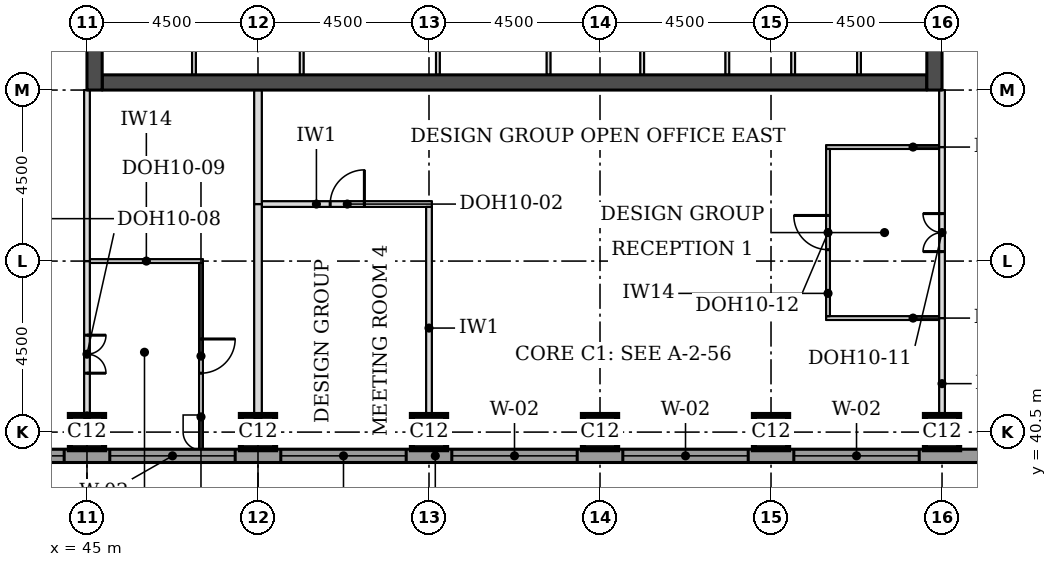
"""IFC4 building model, lengths in metres.
Left out: names, types, materials, properties, quantities, classifications, styles, units other than length and angle.
Written with IfcOpenShell. Run it as: python <this file> out.ifc"""

import sys

from ifc_helpers import new_model, si_unit, direction, frame, frame_2d, origin, origin_2d, place, context, subcontext, project, spatial, rectangle, extrude, element, fill, save


model = new_model("IFC4")
c1 = context("Model", 3, precision=1e-05, world=origin(), true_north=direction((0.0, 1.0)))
c2 = subcontext(c1, "Body", "Model", "MODEL_VIEW")
j1 = project(units=[si_unit("LENGTHUNIT", "METRE"), si_unit("PLANEANGLEUNIT", "RADIAN")], contexts=[c1])
p1 = place(None, origin())
s1 = spatial("IfcSite", under=j1, at=p1, CompositionType="ELEMENT")
p2 = place(p1, origin())
s2 = spatial("IfcBuilding", under=s1, at=p2, CompositionType="ELEMENT")
p3 = place(p2, frame((0.0, 0.0, 226.7)))
s3 = spatial("IfcBuildingStorey", under=s2, at=p3, CompositionType="ELEMENT", Elevation=226.7)
for number, where, z_axis, x_axis in (
    (1, (45.0, 40.5, 0.0), (0.0, 0.0, 1.0), (1.0, 0.0, 0.0)),
    (2, (49.5, 40.5, 0.0), (0.0, 0.0, 1.0), (1.0, 0.0, 0.0)),
    (3, (54.0, 40.5, 0.0), (0.0, 0.0, 1.0), (1.0, 0.0, 0.0)),
    (4, (58.5, 40.5, 0.0), (0.0, 0.0, 1.0), (1.0, 0.0, 0.0)),
    (5, (63.0, 40.5, 0.0), (0.0, 0.0, 1.0), (1.0, 0.0, 0.0)),
    (6, (67.5, 40.5, 0.0), (0.0, 0.0, 1.0), (1.0, 0.0, 0.0)),
):
    element("IfcColumn", number, at=place(p3, frame(where, z_axis=z_axis, x_axis=x_axis)), inside=s3, PredefinedType="COLUMN", context=c2, shape_type="SweptSolid", body=[
        extrude(rectangle(XDim=0.9, YDim=0.9, at=origin_2d()), origin(), (0.0, 0.0, 1.0), 3.7),
    ])
p4 = place(p3, frame((45.4, 49.7, 0.0), z_axis=(0.0, 0.0, 1.0), x_axis=(1.0, 0.0, 0.0)))
e7 = element("IfcWall", 7, at=p4, inside=s3, PredefinedType="SHEAR", context=c2, shape_type="SweptSolid", body=[
    extrude(rectangle(XDim=21.7, YDim=0.4, at=frame_2d((10.85, 0.0))), origin(), (0.0, 0.0, 1.0), 3.7),
])
p5 = place(p3, frame((45.2, 49.5, 0.0), z_axis=(0.0, 0.0, 1.0), x_axis=(0.0, 1.0, 0.0)))
e8 = element("IfcWall", 8, at=p5, inside=s3, PredefinedType="SHEAR", context=c2, shape_type="SweptSolid", body=[
    extrude(rectangle(XDim=22.5, YDim=0.4, at=frame_2d((11.25, 0.0))), origin(), (0.0, 0.0, 1.0), 3.7),
])
p6 = place(p5, frame((4.2, 0.0, 0.0)))
e9 = element("IfcOpeningElement", 9, at=p6, cuts=e8, PredefinedType="OPENING", context=c2, shape_type="SweptSolid", body=[
    extrude(rectangle(XDim=1.8, YDim=2.1, at=frame_2d((0.9, 1.05))), frame((0.0, 0.21, 0.0), z_axis=(0.0, -1.0, 0.0), x_axis=(1.0, 0.0, 0.0)), (0.0, 0.0, 1.0), 0.42),
])
p7 = place(p5, frame((6.9, 0.0, 0.0)))
e10 = element("IfcOpeningElement", 10, at=p7, cuts=e8, PredefinedType="OPENING", context=c2, shape_type="SweptSolid", body=[
    extrude(rectangle(XDim=1.1, YDim=2.1, at=frame_2d((0.55, 1.05))), frame((0.0, 0.21, 0.0), z_axis=(0.0, -1.0, 0.0), x_axis=(1.0, 0.0, 0.0)), (0.0, 0.0, 1.0), 0.42),
])
p8 = place(p5, frame((13.6, 0.0, 0.0)))
e11 = element("IfcOpeningElement", 11, at=p8, cuts=e8, PredefinedType="OPENING", context=c2, shape_type="SweptSolid", body=[
    extrude(rectangle(XDim=1.1, YDim=2.1, at=frame_2d((0.55, 1.05))), frame((0.0, 0.21, 0.0), z_axis=(0.0, -1.0, 0.0), x_axis=(1.0, 0.0, 0.0)), (0.0, 0.0, 1.0), 0.42),
])
p9 = place(p5, frame((16.5, 0.0, 0.0)))
e12 = element("IfcOpeningElement", 12, at=p9, cuts=e8, PredefinedType="OPENING", context=c2, shape_type="SweptSolid", body=[
    extrude(rectangle(XDim=1.8, YDim=2.1, at=frame_2d((0.9, 1.05))), frame((0.0, 0.21, 0.0), z_axis=(0.0, -1.0, 0.0), x_axis=(1.0, 0.0, 0.0)), (0.0, 0.0, 1.0), 0.42),
])
p10 = place(p3, frame((67.3, 49.5, 0.0), z_axis=(0.0, 0.0, 1.0), x_axis=(0.0, 1.0, 0.0)))
e13 = element("IfcWall", 13, at=p10, inside=s3, PredefinedType="SHEAR", context=c2, shape_type="SweptSolid", body=[
    extrude(rectangle(XDim=22.5, YDim=0.4, at=frame_2d((11.25, 0.0))), origin(), (0.0, 0.0, 1.0), 3.7),
])
p11 = place(p10, frame((4.2, 0.0, 0.0)))
e14 = element("IfcOpeningElement", 14, at=p11, cuts=e13, PredefinedType="OPENING", context=c2, shape_type="SweptSolid", body=[
    extrude(rectangle(XDim=1.8, YDim=2.1, at=frame_2d((0.9, 1.05))), frame((0.0, 0.21, 0.0), z_axis=(0.0, -1.0, 0.0), x_axis=(1.0, 0.0, 0.0)), (0.0, 0.0, 1.0), 0.42),
])
p12 = place(p10, frame((6.9, 0.0, 0.0)))
e15 = element("IfcOpeningElement", 15, at=p12, cuts=e13, PredefinedType="OPENING", context=c2, shape_type="SweptSolid", body=[
    extrude(rectangle(XDim=1.1, YDim=2.1, at=frame_2d((0.55, 1.05))), frame((0.0, 0.21, 0.0), z_axis=(0.0, -1.0, 0.0), x_axis=(1.0, 0.0, 0.0)), (0.0, 0.0, 1.0), 0.42),
])
p13 = place(p10, frame((13.6, 0.0, 0.0)))
e16 = element("IfcOpeningElement", 16, at=p13, cuts=e13, PredefinedType="OPENING", context=c2, shape_type="SweptSolid", body=[
    extrude(rectangle(XDim=1.1, YDim=2.1, at=frame_2d((0.55, 1.05))), frame((0.0, 0.21, 0.0), z_axis=(0.0, -1.0, 0.0), x_axis=(1.0, 0.0, 0.0)), (0.0, 0.0, 1.0), 0.42),
])
p14 = place(p10, frame((16.5, 0.0, 0.0)))
e17 = element("IfcOpeningElement", 17, at=p14, cuts=e13, PredefinedType="OPENING", context=c2, shape_type="SweptSolid", body=[
    extrude(rectangle(XDim=1.8, YDim=2.1, at=frame_2d((0.9, 1.05))), frame((0.0, 0.21, 0.0), z_axis=(0.0, -1.0, 0.0), x_axis=(1.0, 0.0, 0.0)), (0.0, 0.0, 1.0), 0.42),
])
p15 = place(p3, frame((36.0, 39.875, 0.0), z_axis=(0.0, 0.0, 1.0), x_axis=(1.0, 0.0, 0.0)))
e18 = element("IfcWall", 18, at=p15, inside=s3, PredefinedType="STANDARD", context=c2, shape_type="SweptSolid", body=[
    extrude(rectangle(XDim=36.331, YDim=0.35, at=frame_2d((18.166, 0.0))), origin(), (0.0, 0.0, 1.0), 3.525),
])
p16 = place(p15, frame((5.1, 0.0, 0.9)))
e19 = element("IfcOpeningElement", 19, at=p16, cuts=e18, PredefinedType="OPENING", context=c2, shape_type="SweptSolid", body=[
    extrude(rectangle(XDim=3.3, YDim=1.9, at=frame_2d((1.65, 0.95))), frame((0.0, 0.185, 0.0), z_axis=(0.0, -1.0, 0.0), x_axis=(1.0, 0.0, 0.0)), (0.0, 0.0, 1.0), 0.37),
])
p17 = place(p15, frame((9.6, 0.0, 0.9)))
e20 = element("IfcOpeningElement", 20, at=p17, cuts=e18, PredefinedType="OPENING", context=c2, shape_type="SweptSolid", body=[
    extrude(rectangle(XDim=3.3, YDim=1.9, at=frame_2d((1.65, 0.95))), frame((0.0, 0.185, 0.0), z_axis=(0.0, -1.0, 0.0), x_axis=(1.0, 0.0, 0.0)), (0.0, 0.0, 1.0), 0.37),
])
p18 = place(p15, frame((14.1, 0.0, 0.9)))
e21 = element("IfcOpeningElement", 21, at=p18, cuts=e18, PredefinedType="OPENING", context=c2, shape_type="SweptSolid", body=[
    extrude(rectangle(XDim=3.3, YDim=1.9, at=frame_2d((1.65, 0.95))), frame((0.0, 0.185, 0.0), z_axis=(0.0, -1.0, 0.0), x_axis=(1.0, 0.0, 0.0)), (0.0, 0.0, 1.0), 0.37),
])
p19 = place(p15, frame((18.6, 0.0, 0.9)))
e22 = element("IfcOpeningElement", 22, at=p19, cuts=e18, PredefinedType="OPENING", context=c2, shape_type="SweptSolid", body=[
    extrude(rectangle(XDim=3.3, YDim=1.9, at=frame_2d((1.65, 0.95))), frame((0.0, 0.185, 0.0), z_axis=(0.0, -1.0, 0.0), x_axis=(1.0, 0.0, 0.0)), (0.0, 0.0, 1.0), 0.37),
])
p20 = place(p15, frame((23.1, 0.0, 0.9)))
e23 = element("IfcOpeningElement", 23, at=p20, cuts=e18, PredefinedType="OPENING", context=c2, shape_type="SweptSolid", body=[
    extrude(rectangle(XDim=3.3, YDim=1.9, at=frame_2d((1.65, 0.95))), frame((0.0, 0.185, 0.0), z_axis=(0.0, -1.0, 0.0), x_axis=(1.0, 0.0, 0.0)), (0.0, 0.0, 1.0), 0.37),
])
p21 = place(p15, frame((27.6, 0.0, 0.9)))
e24 = element("IfcOpeningElement", 24, at=p21, cuts=e18, PredefinedType="OPENING", context=c2, shape_type="SweptSolid", body=[
    extrude(rectangle(XDim=3.3, YDim=1.9, at=frame_2d((1.65, 0.95))), frame((0.0, 0.185, 0.0), z_axis=(0.0, -1.0, 0.0), x_axis=(1.0, 0.0, 0.0)), (0.0, 0.0, 1.0), 0.37),
])
for number, where, z_axis, x_axis in (
    (25, (64.45, 43.5, 0.0), (0.0, 0.0, 1.0), (1.0, 0.0, 0.0)),
    (26, (45.075, 45.0, 0.0), (0.0, 0.0, 1.0), (1.0, 0.0, 0.0)),
):
    element("IfcWall", number, at=place(p3, frame(where, z_axis=z_axis, x_axis=x_axis)), inside=s3, PredefinedType="PARTITIONING", context=c2, shape_type="SweptSolid", body=[
        extrude(rectangle(XDim=2.975, YDim=0.1, at=frame_2d((1.488, 0.0))), origin(), (0.0, 0.0, 1.0), 3.55),
    ])
p22 = place(p3, frame((49.6, 46.5, 0.0), z_axis=(0.0, 0.0, 1.0), x_axis=(1.0, 0.0, 0.0)))
e27 = element("IfcWall", 27, at=p22, inside=s3, PredefinedType="PARTITIONING", context=c2, shape_type="SweptSolid", body=[
    extrude(rectangle(XDim=4.475, YDim=0.15, at=frame_2d((2.237, 0.0))), origin(), (0.0, 0.0, 1.0), 3.55),
])
p23 = place(p22, frame((1.8, 0.0, 0.0)))
e28 = element("IfcOpeningElement", 28, at=p23, cuts=e27, PredefinedType="OPENING", context=c2, shape_type="SweptSolid", body=[
    extrude(rectangle(XDim=0.9, YDim=2.1, at=frame_2d((0.45, 1.05))), frame((0.0, 0.085, 0.0), z_axis=(0.0, -1.0, 0.0), x_axis=(1.0, 0.0, 0.0)), (0.0, 0.0, 1.0), 0.17),
])
p24 = place(p3, frame((64.45, 48.0, 0.0), z_axis=(0.0, 0.0, 1.0), x_axis=(1.0, 0.0, 0.0)))
e29 = element("IfcWall", 29, at=p24, inside=s3, PredefinedType="PARTITIONING", context=c2, shape_type="SweptSolid", body=[
    extrude(rectangle(XDim=2.975, YDim=0.1, at=frame_2d((1.488, 0.0))), origin(), (0.0, 0.0, 1.0), 3.55),
])
p25 = place(p3, frame((45.0, 40.05, 0.0), z_axis=(0.0, 0.0, 1.0), x_axis=(0.0, 1.0, 0.0)))
e30 = element("IfcWall", 30, at=p25, inside=s3, PredefinedType="PARTITIONING", context=c2, shape_type="SweptSolid", body=[
    extrude(rectangle(XDim=4.95, YDim=0.15, at=frame_2d((2.475, 0.0))), origin(), (0.0, 0.0, 1.0), 3.022),
])
p26 = place(p25, frame((2.0, 0.0, 0.0)))
e31 = element("IfcOpeningElement", 31, at=p26, cuts=e30, PredefinedType="OPENING", context=c2, shape_type="SweptSolid", body=[
    extrude(rectangle(XDim=1.0, YDim=2.1, at=frame_2d((0.5, 1.05))), frame((0.0, 0.085, 0.0), z_axis=(0.0, -1.0, 0.0), x_axis=(1.0, 0.0, 0.0)), (0.0, 0.0, 1.0), 0.17),
])
p27 = place(p3, frame((48.0, 40.05, 0.0), z_axis=(0.0, 0.0, 1.0), x_axis=(0.0, 1.0, 0.0)))
e32 = element("IfcWall", 32, at=p27, inside=s3, PredefinedType="PARTITIONING", context=c2, shape_type="SweptSolid", body=[
    extrude(rectangle(XDim=4.9, YDim=0.1, at=frame_2d((2.45, 0.0))), origin(), (0.0, 0.0, 1.0), 3.55),
])
p28 = place(p27, frame((2.0, 0.0, 0.0)))
e33 = element("IfcOpeningElement", 33, at=p28, cuts=e32, PredefinedType="OPENING", context=c2, shape_type="SweptSolid", body=[
    extrude(rectangle(XDim=0.9, YDim=2.1, at=frame_2d((0.45, 1.05))), frame((0.0, 0.06, 0.0), z_axis=(0.0, -1.0, 0.0), x_axis=(1.0, 0.0, 0.0)), (0.0, 0.0, 1.0), 0.12),
])
p29 = place(p3, frame((49.5, 40.05, 0.0), z_axis=(0.0, 0.0, 1.0), x_axis=(0.0, 1.0, 0.0)))
e34 = element("IfcWall", 34, at=p29, inside=s3, PredefinedType="PARTITIONING", context=c2, shape_type="SweptSolid", body=[
    extrude(rectangle(XDim=6.45, YDim=0.2, at=frame_2d((3.225, 0.0))), origin(), (0.0, 0.0, 1.0), 3.55),
])
p30 = place(p3, frame((54.0, 40.05, 0.0), z_axis=(0.0, 0.0, 1.0), x_axis=(0.0, 1.0, 0.0)))
e35 = element("IfcWall", 35, at=p30, inside=s3, PredefinedType="PARTITIONING", context=c2, shape_type="SweptSolid", body=[
    extrude(rectangle(XDim=6.375, YDim=0.15, at=frame_2d((3.188, 0.0))), origin(), (0.0, 0.0, 1.0), 3.55),
])
p31 = place(p3, frame((67.5, 40.05, 0.0), z_axis=(0.0, 0.0, 1.0), x_axis=(0.0, 1.0, 0.0)))
e36 = element("IfcWall", 36, at=p31, inside=s3, PredefinedType="PARTITIONING", context=c2, shape_type="SweptSolid", body=[
    extrude(rectangle(XDim=3.45, YDim=0.15, at=frame_2d((1.725, 0.0))), origin(), (0.0, 0.0, 1.0), 3.022),
])
p32 = place(p3, frame((67.5, 43.5, 0.0), z_axis=(0.0, 0.0, 1.0), x_axis=(0.0, 1.0, 0.0)))
e37 = element("IfcWall", 37, at=p32, inside=s3, PredefinedType="PARTITIONING", context=c2, shape_type="SweptSolid", body=[
    extrude(rectangle(XDim=4.5, YDim=0.15, at=frame_2d((2.25, 0.0))), origin(), (0.0, 0.0, 1.0), 3.022),
])
p33 = place(p32, frame((1.75, 0.0, 0.0)))
e38 = element("IfcOpeningElement", 38, at=p33, cuts=e37, PredefinedType="OPENING", context=c2, shape_type="SweptSolid", body=[
    extrude(rectangle(XDim=1.0, YDim=2.1, at=frame_2d((0.5, 1.05))), frame((0.0, 0.085, 0.0), z_axis=(0.0, -1.0, 0.0), x_axis=(1.0, 0.0, 0.0)), (0.0, 0.0, 1.0), 0.17),
])
p34 = place(p3, frame((64.5, 43.55, 0.0), z_axis=(0.0, 0.0, 1.0), x_axis=(0.0, 1.0, 0.0)))
e39 = element("IfcWall", 39, at=p34, inside=s3, PredefinedType="PARTITIONING", context=c2, shape_type="SweptSolid", body=[
    extrude(rectangle(XDim=4.4, YDim=0.1, at=frame_2d((2.2, 0.0))), origin(), (0.0, 0.0, 1.0), 3.55),
])
p35 = place(p34, frame((1.75, 0.0, 0.0)))
e40 = element("IfcOpeningElement", 40, at=p35, cuts=e39, PredefinedType="OPENING", context=c2, shape_type="SweptSolid", body=[
    extrude(rectangle(XDim=0.9, YDim=2.1, at=frame_2d((0.45, 1.05))), frame((0.0, 0.06, 0.0), z_axis=(0.0, -1.0, 0.0), x_axis=(1.0, 0.0, 0.0)), (0.0, 0.0, 1.0), 0.12),
])
p36 = place(p3, frame((45.0, 45.0, 0.0), z_axis=(0.0, 0.0, 1.0), x_axis=(0.0, 1.0, 0.0)))
e41 = element("IfcWall", 41, at=p36, inside=s3, PredefinedType="PARTITIONING", context=c2, shape_type="SweptSolid", body=[
    extrude(rectangle(XDim=4.5, YDim=0.15, at=frame_2d((2.25, 0.0))), origin(), (0.0, 0.0, 1.0), 3.022),
])
p37 = place(p3, frame((49.5, 46.5, 0.0), z_axis=(0.0, 0.0, 1.0), x_axis=(0.0, 1.0, 0.0)))
e42 = element("IfcWall", 42, at=p37, inside=s3, PredefinedType="PARTITIONING", context=c2, shape_type="SweptSolid", body=[
    extrude(rectangle(XDim=3.0, YDim=0.2, at=frame_2d((1.5, 0.0))), origin(), (0.0, 0.0, 1.0), 3.55),
])
p38 = place(p3, frame((67.5, 48.0, 0.0), z_axis=(0.0, 0.0, 1.0), x_axis=(0.0, 1.0, 0.0)))
e43 = element("IfcWall", 43, at=p38, inside=s3, PredefinedType="PARTITIONING", context=c2, shape_type="SweptSolid", body=[
    extrude(rectangle(XDim=1.5, YDim=0.15, at=frame_2d((0.75, 0.0))), origin(), (0.0, 0.0, 1.0), 3.022),
])
for number, where, z_axis, x_axis in (
    (44, (47.815, 49.9, 0.0), (0.0, 0.0, 1.0), (0.0, 1.0, 0.0)),
    (45, (50.65, 49.9, 0.0), (0.0, 0.0, 1.0), (0.0, 1.0, 0.0)),
    (46, (54.234, 49.9, 0.0), (0.0, 0.0, 1.0), (0.0, 1.0, 0.0)),
    (47, (57.146, 49.9, 0.0), (0.0, 0.0, 1.0), (0.0, 1.0, 0.0)),
    (48, (59.61, 49.9, 0.0), (0.0, 0.0, 1.0), (0.0, 1.0, 0.0)),
    (49, (61.85, 49.9, 0.0), (0.0, 0.0, 1.0), (0.0, 1.0, 0.0)),
    (50, (63.583, 49.9, 0.0), (0.0, 0.0, 1.0), (0.0, 1.0, 0.0)),
    (51, (65.315, 49.9, 0.0), (0.0, 0.0, 1.0), (0.0, 1.0, 0.0)),
):
    element("IfcWall", number, at=place(p3, frame(where, z_axis=z_axis, x_axis=x_axis)), inside=s3, PredefinedType="PARTITIONING", context=c2, shape_type="SweptSolid", body=[
        extrude(rectangle(XDim=3.1, YDim=0.1, at=frame_2d((1.55, 0.0))), origin(), (0.0, 0.0, 1.0), 3.55),
    ])
p39 = place(p16, origin())
e52 = element("IfcWindow", 52, at=p39, inside=s3, PartitioningType="SINGLE_PANEL", PredefinedType="WINDOW", context=c2, shape_type="SweptSolid", body=[
    extrude(rectangle(XDim=3.3, YDim=1.9, at=frame_2d((1.65, 0.95))), frame((0.0, 0.085, 0.0), z_axis=(0.0, -1.0, 0.0), x_axis=(1.0, 0.0, 0.0)), (0.0, 0.0, 1.0), 0.06),
])
fill(e19, e52)
p40 = place(p17, origin())
e53 = element("IfcWindow", 53, at=p40, inside=s3, PartitioningType="SINGLE_PANEL", PredefinedType="WINDOW", context=c2, shape_type="SweptSolid", body=[
    extrude(rectangle(XDim=3.3, YDim=1.9, at=frame_2d((1.65, 0.95))), frame((0.0, 0.085, 0.0), z_axis=(0.0, -1.0, 0.0), x_axis=(1.0, 0.0, 0.0)), (0.0, 0.0, 1.0), 0.06),
])
fill(e20, e53)
p41 = place(p18, origin())
e54 = element("IfcWindow", 54, at=p41, inside=s3, PartitioningType="SINGLE_PANEL", PredefinedType="WINDOW", context=c2, shape_type="SweptSolid", body=[
    extrude(rectangle(XDim=3.3, YDim=1.9, at=frame_2d((1.65, 0.95))), frame((0.0, 0.085, 0.0), z_axis=(0.0, -1.0, 0.0), x_axis=(1.0, 0.0, 0.0)), (0.0, 0.0, 1.0), 0.06),
])
fill(e21, e54)
p42 = place(p19, origin())
e55 = element("IfcWindow", 55, at=p42, inside=s3, PartitioningType="SINGLE_PANEL", PredefinedType="WINDOW", context=c2, shape_type="SweptSolid", body=[
    extrude(rectangle(XDim=3.3, YDim=1.9, at=frame_2d((1.65, 0.95))), frame((0.0, 0.085, 0.0), z_axis=(0.0, -1.0, 0.0), x_axis=(1.0, 0.0, 0.0)), (0.0, 0.0, 1.0), 0.06),
])
fill(e22, e55)
p43 = place(p20, origin())
e56 = element("IfcWindow", 56, at=p43, inside=s3, PartitioningType="SINGLE_PANEL", PredefinedType="WINDOW", context=c2, shape_type="SweptSolid", body=[
    extrude(rectangle(XDim=3.3, YDim=1.9, at=frame_2d((1.65, 0.95))), frame((0.0, 0.085, 0.0), z_axis=(0.0, -1.0, 0.0), x_axis=(1.0, 0.0, 0.0)), (0.0, 0.0, 1.0), 0.06),
])
fill(e23, e56)
p44 = place(p21, origin())
e57 = element("IfcWindow", 57, at=p44, inside=s3, PartitioningType="SINGLE_PANEL", PredefinedType="WINDOW", context=c2, shape_type="SweptSolid", body=[
    extrude(rectangle(XDim=3.3, YDim=1.9, at=frame_2d((1.65, 0.95))), frame((0.0, 0.085, 0.0), z_axis=(0.0, -1.0, 0.0), x_axis=(1.0, 0.0, 0.0)), (0.0, 0.0, 1.0), 0.06),
])
fill(e24, e57)
p45 = place(p26, frame((1.0, 0.0, 0.0), z_axis=(0.0, 0.0, 1.0), x_axis=(-1.0, 0.0, 0.0)))
e58 = element("IfcDoor", 58, at=p45, inside=s3, OperationType="DOUBLE_DOOR_SINGLE_SWING", PredefinedType="DOOR", context=c2, shape_type="SweptSolid", body=[
    extrude(rectangle(XDim=1.0, YDim=2.1, at=frame_2d((0.5, 1.05))), frame((0.0, 0.025, 0.0), z_axis=(0.0, -1.0, 0.0), x_axis=(1.0, 0.0, 0.0)), (0.0, 0.0, 1.0), 0.05),
])
fill(e31, e58)
p46 = place(p28, frame((0.9, 0.0, 0.0), z_axis=(0.0, 0.0, 1.0), x_axis=(-1.0, 0.0, 0.0)))
e59 = element("IfcDoor", 59, at=p46, inside=s3, OperationType="SINGLE_SWING_LEFT", PredefinedType="DOOR", context=c2, shape_type="SweptSolid", body=[
    extrude(rectangle(XDim=0.9, YDim=2.1, at=frame_2d((0.45, 1.05))), frame((0.0, 0.025, 0.0), z_axis=(0.0, -1.0, 0.0), x_axis=(1.0, 0.0, 0.0)), (0.0, 0.0, 1.0), 0.05),
])
fill(e33, e59)
p47 = place(p33, origin())
e60 = element("IfcDoor", 60, at=p47, inside=s3, OperationType="DOUBLE_DOOR_SINGLE_SWING", PredefinedType="DOOR", context=c2, shape_type="SweptSolid", body=[
    extrude(rectangle(XDim=1.0, YDim=2.1, at=frame_2d((0.5, 1.05))), frame((0.0, 0.025, 0.0), z_axis=(0.0, -1.0, 0.0), x_axis=(1.0, 0.0, 0.0)), (0.0, 0.0, 1.0), 0.05),
])
fill(e38, e60)
p48 = place(p35, origin())
e61 = element("IfcDoor", 61, at=p48, inside=s3, OperationType="SINGLE_SWING_RIGHT", PredefinedType="DOOR", context=c2, shape_type="SweptSolid", body=[
    extrude(rectangle(XDim=0.9, YDim=2.1, at=frame_2d((0.45, 1.05))), frame((0.0, 0.025, 0.0), z_axis=(0.0, -1.0, 0.0), x_axis=(1.0, 0.0, 0.0)), (0.0, 0.0, 1.0), 0.05),
])
fill(e40, e61)
p49 = place(p23, origin())
e62 = element("IfcDoor", 62, at=p49, inside=s3, OperationType="SINGLE_SWING_RIGHT", PredefinedType="DOOR", context=c2, shape_type="SweptSolid", body=[
    extrude(rectangle(XDim=0.9, YDim=2.1, at=frame_2d((0.45, 1.05))), frame((0.0, 0.025, 0.0), z_axis=(0.0, -1.0, 0.0), x_axis=(1.0, 0.0, 0.0)), (0.0, 0.0, 1.0), 0.05),
])
fill(e28, e62)
save(model, sys.argv[1])
